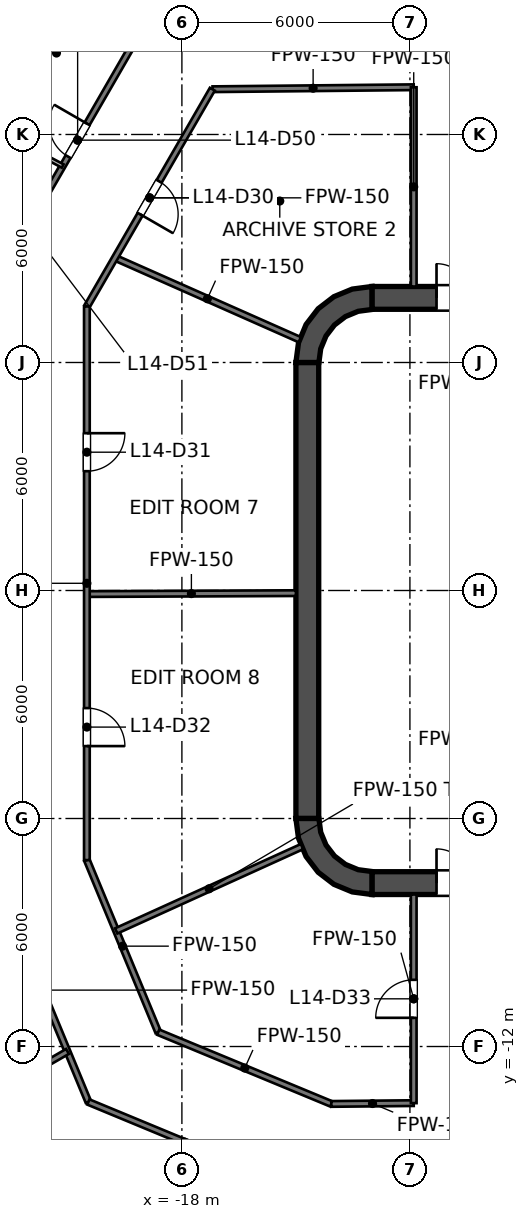
"""IFC4 building model, lengths in metres.
Left out: names, types, materials, properties, quantities, classifications, styles, units other than length and angle.
Written with IfcOpenShell. Run it as: python <this file> out.ifc"""

import sys

from ifc_helpers import new_model, si_unit, direction, frame, frame_2d, origin, place, context, subcontext, project, spatial, polyline, rectangle, outline, extrude, element, fill, save


model = new_model("IFC4")
c1 = context("Model", 3, precision=1e-05, world=origin(), true_north=direction((0.0, 1.0)))
c2 = subcontext(c1, "Body", "Model", "MODEL_VIEW")
j1 = project(units=[si_unit("LENGTHUNIT", "METRE"), si_unit("PLANEANGLEUNIT", "RADIAN")], contexts=[c1])
p1 = place(None, origin())
s1 = spatial("IfcSite", under=j1, at=p1, CompositionType="ELEMENT")
p2 = place(p1, origin())
s2 = spatial("IfcBuilding", under=s1, at=p2, CompositionType="ELEMENT")
p3 = place(p2, frame((0.0, 0.0, 79.8)))
s3 = spatial("IfcBuildingStorey", under=s2, at=p3, CompositionType="ELEMENT", Elevation=79.8)
p4 = place(p3, frame((-13.0, 7.7, 0.0), z_axis=(0.0, 0.0, 1.0), x_axis=(1.0, 0.0, 0.0)))
e1 = element("IfcWall", 1, at=p4, inside=s3, PredefinedType="SHEAR", context=c2, shape_type="SweptSolid", body=[
    extrude(rectangle(XDim=26.0, YDim=0.6, at=frame_2d((13.0, 0.0))), origin(), (0.0, 0.0, 1.0), 4.2),
])
p5 = place(p4, frame((1.7, 0.0, 0.0)))
e2 = element("IfcOpeningElement", 2, at=p5, cuts=e1, PredefinedType="OPENING", context=c2, shape_type="SweptSolid", body=[
    extrude(rectangle(XDim=1.8, YDim=2.1, at=frame_2d((0.9, 1.05))), frame((0.0, 0.3, 0.0), z_axis=(0.0, -1.0, 0.0), x_axis=(1.0, 0.0, 0.0)), (0.0, 0.0, 1.0), 0.6),
])
p6 = place(p4, frame((22.5, 0.0, 0.0)))
e3 = element("IfcOpeningElement", 3, at=p6, cuts=e1, PredefinedType="OPENING", context=c2, shape_type="SweptSolid", body=[
    extrude(rectangle(XDim=1.8, YDim=2.1, at=frame_2d((0.9, 1.05))), frame((0.0, 0.3, 0.0), z_axis=(0.0, -1.0, 0.0), x_axis=(1.0, 0.0, 0.0)), (0.0, 0.0, 1.0), 0.6),
])
p7 = place(p3, frame((-13.0, -7.7, 0.0), z_axis=(0.0, 0.0, 1.0), x_axis=(1.0, 0.0, 0.0)))
e4 = element("IfcWall", 4, at=p7, inside=s3, PredefinedType="SHEAR", context=c2, shape_type="SweptSolid", body=[
    extrude(rectangle(XDim=26.0, YDim=0.6, at=frame_2d((13.0, 0.0))), origin(), (0.0, 0.0, 1.0), 4.2),
])
p8 = place(p7, frame((1.7, 0.0, 0.0)))
e5 = element("IfcOpeningElement", 5, at=p8, cuts=e4, PredefinedType="OPENING", context=c2, shape_type="SweptSolid", body=[
    extrude(rectangle(XDim=1.8, YDim=2.1, at=frame_2d((0.9, 1.05))), frame((0.0, 0.3, 0.0), z_axis=(0.0, -1.0, 0.0), x_axis=(1.0, 0.0, 0.0)), (0.0, 0.0, 1.0), 0.6),
])
p9 = place(p7, frame((22.5, 0.0, 0.0)))
e6 = element("IfcOpeningElement", 6, at=p9, cuts=e4, PredefinedType="OPENING", context=c2, shape_type="SweptSolid", body=[
    extrude(rectangle(XDim=1.8, YDim=2.1, at=frame_2d((0.9, 1.05))), frame((0.0, 0.3, 0.0), z_axis=(0.0, -1.0, 0.0), x_axis=(1.0, 0.0, 0.0)), (0.0, 0.0, 1.0), 0.6),
])
p10 = place(p3, frame((-14.7, -6.0, 0.0), z_axis=(0.0, 0.0, 1.0), x_axis=(0.0, 1.0, 0.0)))
e7 = element("IfcWall", 7, at=p10, inside=s3, PredefinedType="SHEAR", context=c2, shape_type="SweptSolid", body=[
    extrude(rectangle(XDim=12.0, YDim=0.6, at=frame_2d((6.0, 0.0))), origin(), (0.0, 0.0, 1.0), 4.2),
])
p11 = place(p3, origin())
e8 = element("IfcWall", 8, at=p11, inside=s3, PredefinedType="SHEAR", context=c2, shape_type="SweptSolid", body=[
    extrude(outline(polyline([(-15.0, 6.0), (-14.395, 6.0), (-14.347, 6.361), (-14.208, 6.698), (-13.986, 6.986), (-13.698, 7.208), (-13.361, 7.347), (-13.0, 7.395), (-13.0, 8.0), (-13.518, 7.932), (-14.0, 7.732), (-14.414, 7.414), (-14.732, 7.0), (-14.932, 6.518), (-15.0, 6.0)])), origin(), (0.0, 0.0, 1.0), 4.2),
])
e9 = element("IfcWall", 9, at=p11, inside=s3, PredefinedType="SHEAR", context=c2, shape_type="SweptSolid", body=[
    extrude(outline(polyline([(-13.0, -8.0), (-13.0, -7.395), (-13.361, -7.347), (-13.698, -7.208), (-13.986, -6.986), (-14.208, -6.698), (-14.347, -6.361), (-14.395, -6.0), (-15.0, -6.0), (-14.932, -6.518), (-14.732, -7.0), (-14.414, -7.414), (-14.0, -7.732), (-13.518, -7.932), (-13.0, -8.0)])), origin(), (0.0, 0.0, 1.0), 4.2),
])
p12 = place(p3, frame((-11.8, -7.4, 0.0), z_axis=(0.0, 0.0, 1.0), x_axis=(0.0, 1.0, 0.0)))
e10 = element("IfcWall", 10, at=p12, inside=s3, PredefinedType="SOLIDWALL", context=c2, shape_type="SweptSolid", body=[
    extrude(rectangle(XDim=14.8, YDim=0.4, at=frame_2d((7.4, 0.0))), origin(), (0.0, 0.0, 1.0), 4.05),
])
p13 = place(p12, frame((11.2, 0.0, 0.0)))
e11 = element("IfcOpeningElement", 11, at=p13, cuts=e10, PredefinedType="OPENING", context=c2, shape_type="SweptSolid", body=[
    extrude(rectangle(XDim=1.1, YDim=2.1, at=frame_2d((0.55, 1.05))), frame((0.0, 0.2, 0.0), z_axis=(0.0, -1.0, 0.0), x_axis=(1.0, 0.0, 0.0)), (0.0, 0.0, 1.0), 0.4),
])
p14 = place(p12, frame((8.3, 0.0, 0.0)))
e12 = element("IfcOpeningElement", 12, at=p14, cuts=e10, PredefinedType="OPENING", context=c2, shape_type="SweptSolid", body=[
    extrude(rectangle(XDim=1.1, YDim=2.1, at=frame_2d((0.55, 1.05))), frame((0.0, 0.2, 0.0), z_axis=(0.0, -1.0, 0.0), x_axis=(1.0, 0.0, 0.0)), (0.0, 0.0, 1.0), 0.4),
])
p15 = place(p12, frame((5.4, 0.0, 0.0)))
e13 = element("IfcOpeningElement", 13, at=p15, cuts=e10, PredefinedType="OPENING", context=c2, shape_type="SweptSolid", body=[
    extrude(rectangle(XDim=1.1, YDim=2.1, at=frame_2d((0.55, 1.05))), frame((0.0, 0.2, 0.0), z_axis=(0.0, -1.0, 0.0), x_axis=(1.0, 0.0, 0.0)), (0.0, 0.0, 1.0), 0.4),
])
p16 = place(p12, frame((13.552, 0.0, 0.0)))
e14 = element("IfcOpeningElement", 14, at=p16, cuts=e10, PredefinedType="OPENING", context=c2, shape_type="SweptSolid", body=[
    extrude(rectangle(XDim=0.9, YDim=2.1, at=frame_2d((0.45, 1.05))), frame((0.0, 0.2, 0.0), z_axis=(0.0, -1.0, 0.0), x_axis=(1.0, 0.0, 0.0)), (0.0, 0.0, 1.0), 0.4),
])
p17 = place(p12, frame((0.347, 0.0, 0.0)))
e15 = element("IfcOpeningElement", 15, at=p17, cuts=e10, PredefinedType="OPENING", context=c2, shape_type="SweptSolid", body=[
    extrude(rectangle(XDim=0.9, YDim=2.1, at=frame_2d((0.45, 1.05))), frame((0.0, 0.2, 0.0), z_axis=(0.0, -1.0, 0.0), x_axis=(1.0, 0.0, 0.0)), (0.0, 0.0, 1.0), 0.4),
])
e16 = element("IfcWall", 16, at=p11, inside=s3, PredefinedType="SOLIDWALL", context=c2, shape_type="SweptSolid", body=[
    extrude(outline(polyline([(-12.0, -5.925), (-12.0, -5.675), (-14.15, -5.675), (-14.15, -3.025), (-12.0, -3.025), (-12.0, -2.775), (-14.15, -2.775), (-14.15, -0.125), (-12.0, -0.125), (-12.0, 0.125), (-14.15, 0.125), (-14.15, 2.775), (-12.0, 2.775), (-12.0, 3.025), (-14.15, 3.025), (-14.15, 5.675), (-12.0, 5.675), (-12.0, 5.925), (-14.15, 5.925), (-14.4, 5.925), (-14.4, 5.675), (-14.4, 3.025), (-14.4, 2.775), (-14.4, 0.125), (-14.4, -0.125), (-14.4, -2.775), (-14.4, -3.025), (-14.4, -5.675), (-14.4, -5.925), (-14.15, -5.925), (-12.0, -5.925)])), origin(), (0.0, 0.0, 1.0), 4.05),
])
p18 = place(p3, frame((-22.9, -7.572, 0.0), z_axis=(0.0, 0.0, 1.0), x_axis=(0.382860357704, -0.923806227788, 0.0)))
e17 = element("IfcWall", 17, at=p18, inside=s3, PredefinedType="PARTITIONING", context=c2, shape_type="SweptSolid", body=[
    extrude(rectangle(XDim=6.374, YDim=0.15, at=frame_2d((3.187, 0.0))), origin(), (0.0, 0.0, 1.0), 3.195),
])
p19 = place(p18, frame((1.916, 0.0, 0.0)))
e18 = element("IfcOpeningElement", 18, at=p19, cuts=e17, PredefinedType="OPENING", context=c2, shape_type="SweptSolid", body=[
    extrude(rectangle(XDim=1.0, YDim=2.1, at=frame_2d((0.5, 1.05))), frame((0.0, 0.075, 0.0), z_axis=(0.0, -1.0, 0.0), x_axis=(1.0, 0.0, 0.0)), (0.0, 0.0, 1.0), 0.15),
])
p20 = place(p3, frame((-20.5, -7.095, 0.0), z_axis=(0.0, 0.0, 1.0), x_axis=(0.382860567438, -0.923806140866, 0.0)))
e19 = element("IfcWall", 19, at=p20, inside=s3, PredefinedType="PARTITIONING", context=c2, shape_type="SweptSolid", body=[
    extrude(rectangle(XDim=4.902, YDim=0.15, at=frame_2d((2.451, 0.0))), origin(), (0.0, 0.0, 1.0), 3.195),
])
p21 = place(p3, frame((-19.76, 8.755, 0.0), z_axis=(0.0, 0.0, 1.0), x_axis=(0.91424834547, -0.405154245695, 0.0)))
e20 = element("IfcWall", 20, at=p21, inside=s3, PredefinedType="PARTITIONING", context=c2, shape_type="SweptSolid", body=[
    extrude(rectangle(XDim=5.318, YDim=0.15, at=frame_2d((2.659, 0.0))), origin(), (0.0, 0.0, 1.0), 3.195),
])
p22 = place(p3, frame((-20.46, -13.46, 0.0), z_axis=(0.0, 0.0, 1.0), x_axis=(0.923801547606, -0.382871650349, 0.0)))
e21 = element("IfcWall", 21, at=p22, inside=s3, PredefinedType="PARTITIONING", context=c2, shape_type="SweptSolid", body=[
    extrude(rectangle(XDim=6.415, YDim=0.15, at=frame_2d((3.208, 0.0))), origin(), (0.0, 0.0, 1.0), 3.195),
])
p23 = place(p22, frame((2.707, 0.0, 0.0)))
e22 = element("IfcOpeningElement", 22, at=p23, cuts=e21, PredefinedType="OPENING", context=c2, shape_type="SweptSolid", body=[
    extrude(rectangle(XDim=1.0, YDim=2.1, at=frame_2d((0.5, 1.05))), frame((0.0, 0.075, 0.0), z_axis=(0.0, -1.0, 0.0), x_axis=(1.0, 0.0, 0.0)), (0.0, 0.0, 1.0), 0.15),
])
p24 = place(p3, frame((-18.623, -11.623, 0.0), z_axis=(0.0, 0.0, 1.0), x_axis=(0.923791670587, -0.38289548098, 0.0)))
e23 = element("IfcWall", 23, at=p24, inside=s3, PredefinedType="PARTITIONING", context=c2, shape_type="SweptSolid", body=[
    extrude(rectangle(XDim=4.931, YDim=0.15, at=frame_2d((2.465, 0.0))), origin(), (0.0, 0.0, 1.0), 3.195),
])
p25 = place(p3, frame((-20.5, -0.094, 0.0), z_axis=(0.0, 0.0, 1.0), x_axis=(0.999990148138, 0.004438876723, 0.0)))
e24 = element("IfcWall", 24, at=p25, inside=s3, PredefinedType="PARTITIONING", context=c2, shape_type="SweptSolid", body=[
    extrude(rectangle(XDim=5.5, YDim=0.15, at=frame_2d((2.75, 0.0))), origin(), (0.0, 0.0, 1.0), 3.195),
])
p26 = place(p3, frame((-14.068, -13.511, 0.0), z_axis=(0.0, 0.0, 1.0), x_axis=(0.999950911515, 0.009908307647, 0.0)))
e25 = element("IfcWall", 25, at=p26, inside=s3, PredefinedType="PARTITIONING", context=c2, shape_type="SweptSolid", body=[
    extrude(rectangle(XDim=2.168, YDim=0.15, at=frame_2d((1.084, 0.0))), origin(), (0.0, 0.0, 1.0), 3.195),
])
p27 = place(p3, frame((-17.194, 13.191, 0.0), z_axis=(0.0, 0.0, 1.0), x_axis=(0.999950853109, 0.009914200296, 0.0)))
e26 = element("IfcWall", 26, at=p27, inside=s3, PredefinedType="PARTITIONING", context=c2, shape_type="SweptSolid", body=[
    extrude(rectangle(XDim=5.294, YDim=0.15, at=frame_2d((2.647, 0.0))), origin(), (0.0, 0.0, 1.0), 3.195),
])
p28 = place(p3, frame((-19.728, -8.958, 0.0), z_axis=(0.0, 0.0, 1.0), x_axis=(0.910629511797, 0.413223779863, 0.0)))
e27 = element("IfcWall", 27, at=p28, inside=s3, PredefinedType="PARTITIONING", context=c2, shape_type="SweptSolid", body=[
    extrude(rectangle(XDim=5.368, YDim=0.15, at=frame_2d((2.684, 0.0))), origin(), (0.0, 0.0, 1.0), 4.05),
])
p29 = place(p3, frame((-25.005, -14.436, 0.0), z_axis=(0.0, 0.0, 1.0), x_axis=(0.866022493768, 0.500005040262, 0.0)))
e28 = element("IfcWall", 28, at=p29, inside=s3, PredefinedType="PARTITIONING", context=c2, shape_type="SweptSolid", body=[
    extrude(rectangle(XDim=4.612, YDim=0.15, at=frame_2d((2.306, 0.0))), origin(), (0.0, 0.0, 1.0), 3.352),
])
p30 = place(p3, frame((-20.5, 7.474, 0.0), z_axis=(0.0, 0.0, 1.0), x_axis=(0.500012665616, 0.866018091164, 0.0)))
e29 = element("IfcWall", 29, at=p30, inside=s3, PredefinedType="PARTITIONING", context=c2, shape_type="SweptSolid", body=[
    extrude(rectangle(XDim=6.602, YDim=0.15, at=frame_2d((3.301, 0.0))), origin(), (0.0, 0.0, 1.0), 3.195),
])
p31 = place(p30, frame((2.803, 0.0, 0.0)))
e30 = element("IfcOpeningElement", 30, at=p31, cuts=e29, PredefinedType="OPENING", context=c2, shape_type="SweptSolid", body=[
    extrude(rectangle(XDim=1.0, YDim=2.1, at=frame_2d((0.5, 1.05))), frame((0.0, 0.075, 0.0), z_axis=(0.0, -1.0, 0.0), x_axis=(1.0, 0.0, 0.0)), (0.0, 0.0, 1.0), 0.15),
])
p32 = place(p3, frame((-22.9, 8.117, 0.0), z_axis=(0.0, 0.0, 1.0), x_axis=(0.499983791763, 0.866034761412, 0.0)))
e31 = element("IfcWall", 31, at=p32, inside=s3, PredefinedType="PARTITIONING", context=c2, shape_type="SweptSolid", body=[
    extrude(rectangle(XDim=8.626, YDim=0.15, at=frame_2d((4.313, 0.0))), origin(), (0.0, 0.0, 1.0), 3.195),
])
p33 = place(p32, frame((3.812, 0.0, 0.0)))
e32 = element("IfcOpeningElement", 32, at=p33, cuts=e31, PredefinedType="OPENING", context=c2, shape_type="SweptSolid", body=[
    extrude(rectangle(XDim=1.0, YDim=2.1, at=frame_2d((0.5, 1.05))), frame((0.0, 0.075, 0.0), z_axis=(0.0, -1.0, 0.0), x_axis=(1.0, 0.0, 0.0)), (0.0, 0.0, 1.0), 0.15),
])
p34 = place(p32, frame((1.213, 0.0, 0.0)))
e33 = element("IfcOpeningElement", 33, at=p34, cuts=e31, PredefinedType="OPENING", context=c2, shape_type="SweptSolid", body=[
    extrude(rectangle(XDim=1.0, YDim=2.1, at=frame_2d((0.5, 1.05))), frame((0.0, 0.075, 0.0), z_axis=(0.0, -1.0, 0.0), x_axis=(1.0, 0.0, 0.0)), (0.0, 0.0, 1.0), 0.15),
])
p35 = place(p3, frame((-11.9, -13.49, 0.0), z_axis=(0.0, 0.0, 1.0), x_axis=(0.0, 1.0, 0.0)))
e34 = element("IfcWall", 34, at=p35, inside=s3, PredefinedType="PARTITIONING", context=c2, shape_type="SweptSolid", body=[
    extrude(rectangle(XDim=5.49, YDim=0.15, at=frame_2d((2.745, 0.0))), origin(), (0.0, 0.0, 1.0), 3.195),
])
p36 = place(p35, frame((2.245, 0.0, 0.0)))
e35 = element("IfcOpeningElement", 35, at=p36, cuts=e34, PredefinedType="OPENING", context=c2, shape_type="SweptSolid", body=[
    extrude(rectangle(XDim=1.0, YDim=2.1, at=frame_2d((0.5, 1.05))), frame((0.0, 0.075, 0.0), z_axis=(0.0, -1.0, 0.0), x_axis=(1.0, 0.0, 0.0)), (0.0, 0.0, 1.0), 0.15),
])
p37 = place(p3, frame((-11.9, 8.0, 0.0), z_axis=(0.0, 0.0, 1.0), x_axis=(0.0, 1.0, 0.0)))
e36 = element("IfcWall", 36, at=p37, inside=s3, PredefinedType="PARTITIONING", context=c2, shape_type="SweptSolid", body=[
    extrude(rectangle(XDim=5.243, YDim=0.15, at=frame_2d((2.622, 0.0))), origin(), (0.0, 0.0, 1.0), 3.195),
])
p38 = place(p3, frame((-20.5, -7.095, 0.0), z_axis=(0.0, 0.0, 1.0), x_axis=(0.0, 1.0, 0.0)))
e37 = element("IfcWall", 37, at=p38, inside=s3, PredefinedType="PARTITIONING", context=c2, shape_type="SweptSolid", body=[
    extrude(rectangle(XDim=14.569, YDim=0.15, at=frame_2d((7.285, 0.0))), origin(), (0.0, 0.0, 1.0), 3.118),
])
p39 = place(p38, frame((10.234, 0.0, 0.0)))
e38 = element("IfcOpeningElement", 38, at=p39, cuts=e37, PredefinedType="OPENING", context=c2, shape_type="SweptSolid", body=[
    extrude(rectangle(XDim=1.0, YDim=2.1, at=frame_2d((0.5, 1.05))), frame((0.0, 0.075, 0.0), z_axis=(0.0, -1.0, 0.0), x_axis=(1.0, 0.0, 0.0)), (0.0, 0.0, 1.0), 0.15),
])
p40 = place(p38, frame((3.0, 0.0, 0.0)))
e39 = element("IfcOpeningElement", 39, at=p40, cuts=e37, PredefinedType="OPENING", context=c2, shape_type="SweptSolid", body=[
    extrude(rectangle(XDim=1.0, YDim=2.1, at=frame_2d((0.5, 1.05))), frame((0.0, 0.075, 0.0), z_axis=(0.0, -1.0, 0.0), x_axis=(1.0, 0.0, 0.0)), (0.0, 0.0, 1.0), 0.15),
])
p41 = place(p3, frame((-23.994, 12.681, 0.0), z_axis=(0.0, 0.0, 1.0), x_axis=(0.884105641911, -0.467287078723, 0.0)))
e40 = element("IfcWall", 40, at=p41, inside=s3, PredefinedType="PARTITIONING", context=c2, shape_type="SweptSolid", body=[
    extrude(rectangle(XDim=3.231, YDim=0.1, at=frame_2d((1.616, 0.0))), origin(), (0.0, 0.0, 1.0), 4.05),
])
p42 = place(p3, frame((-26.13, 8.983, 0.0), z_axis=(0.0, 0.0, 1.0), x_axis=(0.500107000949, 0.865963617944, 0.0)))
e41 = element("IfcWall", 41, at=p42, inside=s3, PredefinedType="PARTITIONING", context=c2, shape_type="SweptSolid", body=[
    extrude(rectangle(XDim=10.038, YDim=0.1, at=frame_2d((5.019, 0.0))), origin(), (0.0, 0.0, 1.0), 3.195),
])
p43 = place(p42, frame((4.521, 0.0, 0.0)))
e42 = element("IfcOpeningElement", 42, at=p43, cuts=e41, PredefinedType="OPENING", context=c2, shape_type="SweptSolid", body=[
    extrude(rectangle(XDim=0.9, YDim=2.1, at=frame_2d((0.45, 1.05))), frame((0.0, 0.05, 0.0), z_axis=(0.0, -1.0, 0.0), x_axis=(1.0, 0.0, 0.0)), (0.0, 0.0, 1.0), 0.1),
])
p44 = place(p13, origin())
e43 = element("IfcDoor", 43, at=p44, inside=s3, OperationType="DOUBLE_DOOR_SLIDING", PredefinedType="DOOR", context=c2, shape_type="SweptSolid", body=[
    extrude(rectangle(XDim=1.1, YDim=2.1, at=frame_2d((0.55, 1.05))), frame((0.0, 0.025, 0.0), z_axis=(0.0, -1.0, 0.0), x_axis=(1.0, 0.0, 0.0)), (0.0, 0.0, 1.0), 0.05),
])
fill(e11, e43)
p45 = place(p14, origin())
e44 = element("IfcDoor", 44, at=p45, inside=s3, OperationType="DOUBLE_DOOR_SLIDING", PredefinedType="DOOR", context=c2, shape_type="SweptSolid", body=[
    extrude(rectangle(XDim=1.1, YDim=2.1, at=frame_2d((0.55, 1.05))), frame((0.0, 0.025, 0.0), z_axis=(0.0, -1.0, 0.0), x_axis=(1.0, 0.0, 0.0)), (0.0, 0.0, 1.0), 0.05),
])
fill(e12, e44)
p46 = place(p15, origin())
e45 = element("IfcDoor", 45, at=p46, inside=s3, OperationType="DOUBLE_DOOR_SLIDING", PredefinedType="DOOR", context=c2, shape_type="SweptSolid", body=[
    extrude(rectangle(XDim=1.1, YDim=2.1, at=frame_2d((0.55, 1.05))), frame((0.0, 0.025, 0.0), z_axis=(0.0, -1.0, 0.0), x_axis=(1.0, 0.0, 0.0)), (0.0, 0.0, 1.0), 0.05),
])
fill(e13, e45)
p47 = place(p16, origin())
e46 = element("IfcDoor", 46, at=p47, inside=s3, OperationType="SINGLE_SWING_LEFT", PredefinedType="DOOR", context=c2, shape_type="SweptSolid", body=[
    extrude(rectangle(XDim=0.9, YDim=2.1, at=frame_2d((0.45, 1.05))), frame((0.0, 0.025, 0.0), z_axis=(0.0, -1.0, 0.0), x_axis=(1.0, 0.0, 0.0)), (0.0, 0.0, 1.0), 0.05),
])
fill(e14, e46)
p48 = place(p17, origin())
e47 = element("IfcDoor", 47, at=p48, inside=s3, OperationType="SINGLE_SWING_LEFT", PredefinedType="DOOR", context=c2, shape_type="SweptSolid", body=[
    extrude(rectangle(XDim=0.9, YDim=2.1, at=frame_2d((0.45, 1.05))), frame((0.0, 0.025, 0.0), z_axis=(0.0, -1.0, 0.0), x_axis=(1.0, 0.0, 0.0)), (0.0, 0.0, 1.0), 0.05),
])
fill(e15, e47)
p49 = place(p5, origin())
e48 = element("IfcDoor", 48, at=p49, inside=s3, OperationType="DOUBLE_DOOR_SINGLE_SWING", PredefinedType="DOOR", context=c2, shape_type="SweptSolid", body=[
    extrude(rectangle(XDim=1.8, YDim=2.1, at=frame_2d((0.9, 1.05))), frame((0.0, 0.025, 0.0), z_axis=(0.0, -1.0, 0.0), x_axis=(1.0, 0.0, 0.0)), (0.0, 0.0, 1.0), 0.05),
])
fill(e2, e48)
p50 = place(p8, origin())
e49 = element("IfcDoor", 49, at=p50, inside=s3, OperationType="DOUBLE_DOOR_SINGLE_SWING", PredefinedType="DOOR", context=c2, shape_type="SweptSolid", body=[
    extrude(rectangle(XDim=1.8, YDim=2.1, at=frame_2d((0.9, 1.05))), frame((0.0, 0.025, 0.0), z_axis=(0.0, -1.0, 0.0), x_axis=(1.0, 0.0, 0.0)), (0.0, 0.0, 1.0), 0.05),
])
fill(e5, e49)
p51 = place(p31, origin())
e50 = element("IfcDoor", 50, at=p51, inside=s3, OperationType="SINGLE_SWING_LEFT", PredefinedType="DOOR", context=c2, shape_type="SweptSolid", body=[
    extrude(rectangle(XDim=1.0, YDim=2.1, at=frame_2d((0.5, 1.05))), frame((0.0, 0.025, 0.0), z_axis=(0.0, -1.0, 0.0), x_axis=(1.0, 0.0, 0.0)), (0.0, 0.0, 1.0), 0.05),
])
fill(e30, e50)
p52 = place(p39, origin())
e51 = element("IfcDoor", 51, at=p52, inside=s3, OperationType="SINGLE_SWING_RIGHT", PredefinedType="DOOR", context=c2, shape_type="SweptSolid", body=[
    extrude(rectangle(XDim=1.0, YDim=2.1, at=frame_2d((0.5, 1.05))), frame((0.0, 0.025, 0.0), z_axis=(0.0, -1.0, 0.0), x_axis=(1.0, 0.0, 0.0)), (0.0, 0.0, 1.0), 0.05),
])
fill(e38, e51)
p53 = place(p40, origin())
e52 = element("IfcDoor", 52, at=p53, inside=s3, OperationType="SINGLE_SWING_LEFT", PredefinedType="DOOR", context=c2, shape_type="SweptSolid", body=[
    extrude(rectangle(XDim=1.0, YDim=2.1, at=frame_2d((0.5, 1.05))), frame((0.0, 0.025, 0.0), z_axis=(0.0, -1.0, 0.0), x_axis=(1.0, 0.0, 0.0)), (0.0, 0.0, 1.0), 0.05),
])
fill(e39, e52)
p54 = place(p36, origin())
e53 = element("IfcDoor", 53, at=p54, inside=s3, OperationType="SINGLE_SWING_LEFT", PredefinedType="DOOR", context=c2, shape_type="SweptSolid", body=[
    extrude(rectangle(XDim=1.0, YDim=2.1, at=frame_2d((0.5, 1.05))), frame((0.0, 0.025, 0.0), z_axis=(0.0, -1.0, 0.0), x_axis=(1.0, 0.0, 0.0)), (0.0, 0.0, 1.0), 0.05),
])
fill(e35, e53)
p55 = place(p33, origin())
e54 = element("IfcDoor", 54, at=p55, inside=s3, OperationType="SINGLE_SWING_RIGHT", PredefinedType="DOOR", context=c2, shape_type="SweptSolid", body=[
    extrude(rectangle(XDim=1.0, YDim=2.1, at=frame_2d((0.5, 1.05))), frame((0.0, 0.025, 0.0), z_axis=(0.0, -1.0, 0.0), x_axis=(1.0, 0.0, 0.0)), (0.0, 0.0, 1.0), 0.05),
])
fill(e32, e54)
save(model, sys.argv[1])
